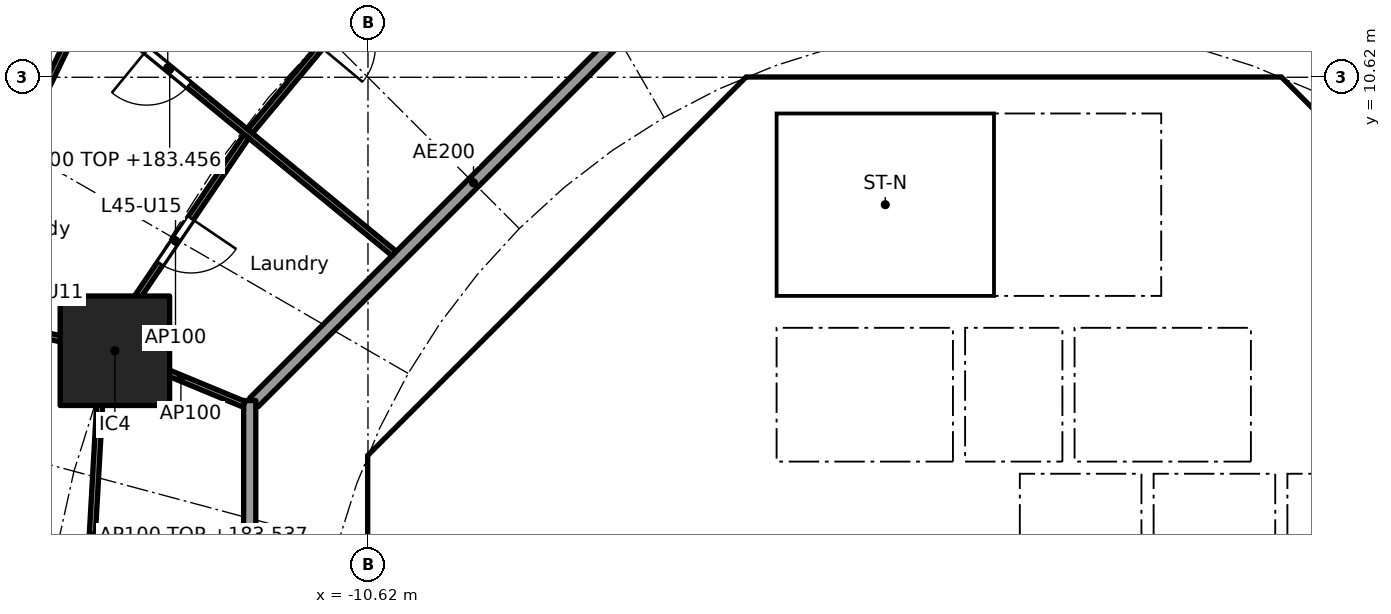
"""IFC4 building model, lengths in metres.
Left out: names, types, materials, properties, quantities, classifications, styles, units other than length and angle.
Written with IfcOpenShell. Run it as: python <this file> out.ifc"""

import sys

from ifc_helpers import new_model, si_unit, direction, frame, frame_2d, origin, origin_2d, place, context, subcontext, project, spatial, polyline, rectangle, outline, extrude, element, fill, save


model = new_model("IFC4")
c1 = context("Model", 3, precision=1e-05, world=origin(), true_north=direction((0.0, 1.0)))
c2 = subcontext(c1, "Body", "Model", "MODEL_VIEW")
j1 = project(units=[si_unit("LENGTHUNIT", "METRE"), si_unit("PLANEANGLEUNIT", "RADIAN")], contexts=[c1])
p1 = place(None, origin())
s1 = spatial("IfcSite", under=j1, at=p1, CompositionType="ELEMENT")
p2 = place(p1, origin())
s2 = spatial("IfcBuilding", under=s1, at=p2, CompositionType="ELEMENT")
p3 = place(p2, frame((0.0, 0.0, 180.7)))
s3 = spatial("IfcBuildingStorey", under=s2, at=p3, CompositionType="ELEMENT", Elevation=180.7)
p4 = place(p3, frame((-14.782, 6.123, 0.0), z_axis=(0.0, 0.0, 1.0), x_axis=(1.0, 0.0, 0.0)))
e1 = element("IfcColumn", 1, at=p4, inside=s3, PredefinedType="COLUMN", context=c2, shape_type="SweptSolid", body=[
    extrude(rectangle(XDim=1.8, YDim=1.8, at=origin_2d()), origin(), (0.0, 0.0, 1.0), 3.7),
])
p5 = place(p3, frame((9.988, 4.613, 0.0), z_axis=(0.0, 0.0, 1.0), x_axis=(-0.707106781187, 0.707106781187, 0.0)))
e2 = element("IfcWall", 2, at=p5, inside=s3, PredefinedType="SHEAR", context=c2, shape_type="SweptSolid", body=[
    extrude(rectangle(XDim=7.602, YDim=0.6, at=frame_2d((3.801, 0.0))), origin(), (0.0, 0.0, 1.0), 3.44),
])
p6 = place(p5, frame((3.201, 0.0, 0.0)))
e3 = element("IfcOpeningElement", 3, at=p6, cuts=e2, PredefinedType="OPENING", context=c2, shape_type="SweptSolid", body=[
    extrude(rectangle(XDim=1.2, YDim=2.1, at=frame_2d((0.6, 1.05))), frame((0.0, 0.31, 0.0), z_axis=(0.0, -1.0, 0.0), x_axis=(1.0, 0.0, 0.0)), (0.0, 0.0, 1.0), 0.62),
])
p7 = place(p3, frame((-4.613, 9.988, 0.0), z_axis=(0.0, 0.0, 1.0), x_axis=(-0.707106781187, -0.707106781187, 0.0)))
e4 = element("IfcWall", 4, at=p7, inside=s3, PredefinedType="SHEAR", context=c2, shape_type="SweptSolid", body=[
    extrude(rectangle(XDim=7.602, YDim=0.6, at=frame_2d((3.801, 0.0))), origin(), (0.0, 0.0, 1.0), 3.44),
])
p8 = place(p7, frame((0.351, 0.0, 0.0)))
e5 = element("IfcOpeningElement", 5, at=p8, cuts=e4, PredefinedType="OPENING", context=c2, shape_type="SweptSolid", body=[
    extrude(rectangle(XDim=1.1, YDim=2.1, at=frame_2d((0.55, 1.05))), frame((0.0, 0.31, 0.0), z_axis=(0.0, -1.0, 0.0), x_axis=(1.0, 0.0, 0.0)), (0.0, 0.0, 1.0), 0.62),
])
p9 = place(p3, frame((-10.325, 3.801, 0.0), z_axis=(0.0, 0.0, 1.0), x_axis=(0.0, -1.0, 0.0)))
e6 = element("IfcWall", 6, at=p9, inside=s3, PredefinedType="SHEAR", context=c2, shape_type="SweptSolid", body=[
    extrude(rectangle(XDim=7.602, YDim=0.6, at=frame_2d((3.801, 0.0))), origin(), (0.0, 0.0, 1.0), 3.44),
])
p10 = place(p9, frame((0.651, 0.0, 0.0)))
e7 = element("IfcOpeningElement", 7, at=p10, cuts=e6, PredefinedType="OPENING", context=c2, shape_type="SweptSolid", body=[
    extrude(rectangle(XDim=1.5, YDim=2.1, at=frame_2d((0.75, 1.05))), frame((0.0, 0.31, 0.0), z_axis=(0.0, -1.0, 0.0), x_axis=(1.0, 0.0, 0.0)), (0.0, 0.0, 1.0), 0.62),
])
p11 = place(p9, frame((5.451, 0.0, 0.0)))
e8 = element("IfcOpeningElement", 8, at=p11, cuts=e6, PredefinedType="OPENING", context=c2, shape_type="SweptSolid", body=[
    extrude(rectangle(XDim=1.5, YDim=2.1, at=frame_2d((0.75, 1.05))), frame((0.0, 0.31, 0.0), z_axis=(0.0, -1.0, 0.0), x_axis=(1.0, 0.0, 0.0)), (0.0, 0.0, 1.0), 0.62),
])
p12 = place(p3, frame((-5.8, 4.3, 0.0), z_axis=(0.0, 0.0, 1.0), x_axis=(0.0, 1.0, 0.0)))
e9 = element("IfcWall", 9, at=p12, inside=s3, PredefinedType="PARTITIONING", context=c2, shape_type="SweptSolid", body=[
    extrude(rectangle(XDim=3.927, YDim=0.15, at=frame_2d((1.963, 0.0))), origin(), (0.0, 0.0, 1.0), 3.44),
])
p13 = place(p12, frame((0.413, 0.0, 0.0)))
e10 = element("IfcOpeningElement", 10, at=p13, cuts=e9, PredefinedType="OPENING", context=c2, shape_type="SweptSolid", body=[
    extrude(rectangle(XDim=0.9, YDim=2.1, at=frame_2d((0.45, 1.05))), frame((0.0, 0.085, 0.0), z_axis=(0.0, -1.0, 0.0), x_axis=(1.0, 0.0, 0.0)), (0.0, 0.0, 1.0), 0.17),
])
p14 = place(p12, frame((2.489, 0.0, 0.0)))
e11 = element("IfcOpeningElement", 11, at=p14, cuts=e9, PredefinedType="OPENING", context=c2, shape_type="SweptSolid", body=[
    extrude(rectangle(XDim=0.9, YDim=2.1, at=frame_2d((0.45, 1.05))), frame((0.0, 0.085, 0.0), z_axis=(0.0, -1.0, 0.0), x_axis=(1.0, 0.0, 0.0)), (0.0, 0.0, 1.0), 0.17),
])
p15 = place(p3, frame((4.0, 4.3, 0.0), z_axis=(0.0, 0.0, 1.0), x_axis=(0.0, 1.0, 0.0)))
e12 = element("IfcWall", 12, at=p15, inside=s3, PredefinedType="SOLIDWALL", context=c2, shape_type="SweptSolid", body=[
    extrude(rectangle(XDim=2.2, YDim=0.2, at=frame_2d((1.1, 0.0))), origin(), (0.0, 0.0, 1.0), 3.44),
])
p16 = place(p15, frame((0.55, 0.0, 0.0)))
e13 = element("IfcOpeningElement", 13, at=p16, cuts=e12, PredefinedType="OPENING", context=c2, shape_type="SweptSolid", body=[
    extrude(rectangle(XDim=1.1, YDim=2.1, at=frame_2d((0.55, 1.05))), frame((0.0, 0.11, 0.0), z_axis=(0.0, -1.0, 0.0), x_axis=(1.0, 0.0, 0.0)), (0.0, 0.0, 1.0), 0.22),
])
p17 = place(p3, frame((-4.0, 4.3, 0.0), z_axis=(0.0, 0.0, 1.0), x_axis=(0.0, 1.0, 0.0)))
e14 = element("IfcWall", 14, at=p17, inside=s3, PredefinedType="SOLIDWALL", context=c2, shape_type="SweptSolid", body=[
    extrude(rectangle(XDim=2.2, YDim=0.2, at=frame_2d((1.1, 0.0))), origin(), (0.0, 0.0, 1.0), 3.44),
])
p18 = place(p17, frame((0.55, 0.0, 0.0)))
e15 = element("IfcOpeningElement", 15, at=p18, cuts=e14, PredefinedType="OPENING", context=c2, shape_type="SweptSolid", body=[
    extrude(rectangle(XDim=1.1, YDim=2.1, at=frame_2d((0.55, 1.05))), frame((0.0, 0.11, 0.0), z_axis=(0.0, -1.0, 0.0), x_axis=(1.0, 0.0, 0.0)), (0.0, 0.0, 1.0), 0.22),
])
p19 = place(p3, frame((4.0, 7.025, 0.0), z_axis=(0.0, 0.0, 1.0), x_axis=(0.0, 1.0, 0.0)))
e16 = element("IfcWall", 16, at=p19, inside=s3, PredefinedType="SOLIDWALL", context=c2, shape_type="SweptSolid", body=[
    extrude(rectangle(XDim=3.0, YDim=0.2, at=frame_2d((1.5, 0.0))), origin(), (0.0, 0.0, 1.0), 3.44),
])
p20 = place(p19, frame((0.925, 0.0, 0.0)))
e17 = element("IfcOpeningElement", 17, at=p20, cuts=e16, PredefinedType="OPENING", context=c2, shape_type="SweptSolid", body=[
    extrude(rectangle(XDim=1.1, YDim=2.1, at=frame_2d((0.55, 1.05))), frame((0.0, 0.11, 0.0), z_axis=(0.0, -1.0, 0.0), x_axis=(1.0, 0.0, 0.0)), (0.0, 0.0, 1.0), 0.22),
])
p21 = place(p3, origin())
e18 = element("IfcWall", 18, at=p21, inside=s3, PredefinedType="SHEAR", context=c2, shape_type="SweptSolid", body=[
    extrude(outline(polyline([(-10.2, 4.825), (-9.776, 4.401), (-10.025, 4.152), (-10.025, 3.801), (-10.625, 3.801), (-10.625, 4.401), (-10.2, 4.825)])), origin(), (0.0, 0.0, 1.0), 3.44),
])
p22 = place(p3, origin())
e19 = element("IfcWall", 19, at=p22, inside=s3, PredefinedType="SHEAR", context=c2, shape_type="SweptSolid", body=[
    extrude(outline(polyline([(-4.152, 10.025), (-4.401, 9.776), (-4.825, 10.2), (-4.401, 10.625), (4.401, 10.625), (4.825, 10.2), (4.401, 9.776), (4.152, 10.025), (-4.152, 10.025)])), origin(), (0.0, 0.0, 1.0), 3.44),
])
p23 = place(p3, frame((-10.025, 4.0, 0.0), z_axis=(0.0, 0.0, 1.0), x_axis=(1.0, 0.0, 0.0)))
e20 = element("IfcWall", 20, at=p23, inside=s3, PredefinedType="PARTITIONING", context=c2, shape_type="SweptSolid", body=[
    extrude(rectangle(XDim=3.325, YDim=0.2, at=frame_2d((1.662, 0.0))), origin(), (0.0, 0.0, 1.0), 3.44),
])
p24 = place(p3, frame((-8.001, 6.1, 0.0), z_axis=(0.0, 0.0, 1.0), x_axis=(1.0, 0.0, 0.0)))
e21 = element("IfcWall", 21, at=p24, inside=s3, PredefinedType="PARTITIONING", context=c2, shape_type="SweptSolid", body=[
    extrude(rectangle(XDim=2.126, YDim=0.15, at=frame_2d((1.063, 0.0))), origin(), (0.0, 0.0, 1.0), 3.44),
])
for number, where, z_axis, x_axis in (
    (22, (-0.9, 4.3, 0.0), (0.0, 0.0, 1.0), (0.0, 1.0, 0.0)),
    (23, (0.9, 4.3, 0.0), (0.0, 0.0, 1.0), (0.0, 1.0, 0.0)),
):
    element("IfcWall", number, at=place(p3, frame(where, z_axis=z_axis, x_axis=x_axis)), inside=s3, PredefinedType="SOLIDWALL", context=c2, shape_type="SweptSolid", body=[
        extrude(rectangle(XDim=2.2, YDim=0.2, at=frame_2d((1.1, 0.0))), origin(), (0.0, 0.0, 1.0), 3.44),
    ])
p25 = place(p3, origin())
e24 = element("IfcWall", 24, at=p25, inside=s3, PredefinedType="SOLIDWALL", context=c2, shape_type="SweptSolid", body=[
    extrude(outline(polyline([(-6.7, 4.3), (6.7, 4.3), (6.7, 2.1), (6.5, 2.1), (6.5, 4.1), (4.5, 4.1), (4.5, 2.1), (4.3, 2.1), (4.3, 4.1), (2.3, 4.1), (2.3, 2.1), (2.1, 2.1), (2.1, 4.1), (0.1, 4.1), (0.1, 2.1), (-0.1, 2.1), (-0.1, 4.1), (-4.3, 4.1), (-4.3, 2.1), (-4.5, 2.1), (-4.5, 4.1), (-6.5, 4.1), (-6.5, 2.1), (-6.7, 2.1), (-6.7, 4.3)])), origin(), (0.0, 0.0, 1.0), 3.44),
])
p26 = place(p3, origin())
e25 = element("IfcWall", 25, at=p26, inside=s3, PredefinedType="SOLIDWALL", context=c2, shape_type="SweptSolid", body=[
    extrude(outline(polyline([(-3.9, 7.025), (-4.1, 7.025), (-4.1, 10.025), (-3.9, 10.025), (-3.9, 7.025)])), origin(), (0.0, 0.0, 1.0), 3.44),
])
p27 = place(p3, origin())
e26 = element("IfcWall", 26, at=p27, inside=s3, PredefinedType="SOLIDWALL", context=c2, shape_type="SweptSolid", body=[
    extrude(outline(polyline([(4.1, 6.5), (-4.1, 6.5), (-4.1, 7.025), (4.1, 7.025), (4.1, 6.5)])), origin(), (0.0, 0.0, 1.0), 3.44),
])
p28 = place(p3, frame((-5.275, 12.494, 0.0), z_axis=(0.0, 0.0, 1.0), x_axis=(-0.707106781187, -0.707106781187, 0.0)))
e27 = element("IfcWall", 27, at=p28, inside=s3, PredefinedType="PARTITIONING", context=c2, shape_type="SweptSolid", body=[
    extrude(rectangle(XDim=10.209, YDim=0.2, at=frame_2d((5.104, 0.0))), origin(), (0.0, 0.0, 1.0), 3.44),
])
p29 = place(p3, frame((-12.565, 5.304, 0.0), z_axis=(0.0, 0.0, 1.0), x_axis=(0.0, -1.0, 0.0)))
e28 = element("IfcWall", 28, at=p29, inside=s3, PredefinedType="PARTITIONING", context=c2, shape_type="SweptSolid", body=[
    extrude(rectangle(XDim=10.409, YDim=0.2, at=frame_2d((5.205, 0.0))), origin(), (0.0, 0.0, 1.0), 3.44),
])
p30 = place(p3, frame((-9.631, 13.242, 0.0), z_axis=(0.0, 0.0, 1.0), x_axis=(-0.640315711982, -0.768111833647, 0.0)))
e29 = element("IfcWall", 29, at=p30, inside=s3, PredefinedType="PARTITIONING", context=c2, shape_type="SweptSolid", body=[
    extrude(rectangle(XDim=4.572, YDim=0.1, at=frame_2d((2.286, 0.0))), origin(), (0.0, 0.0, 1.0), 2.837),
])
p31 = place(p30, frame((1.861, 0.0, 0.0)))
e30 = element("IfcOpeningElement", 30, at=p31, cuts=e29, PredefinedType="OPENING", context=c2, shape_type="SweptSolid", body=[
    extrude(rectangle(XDim=0.9, YDim=2.1, at=frame_2d((0.45, 1.05))), frame((0.0, 0.06, 0.0), z_axis=(0.0, -1.0, 0.0), x_axis=(1.0, 0.0, 0.0)), (0.0, 0.0, 1.0), 0.12),
])
p32 = place(p3, frame((-10.189, 7.721, 0.0), z_axis=(0.0, 0.0, 1.0), x_axis=(-0.773134429339, 0.634242188892, 0.0)))
e31 = element("IfcWall", 31, at=p32, inside=s3, PredefinedType="PARTITIONING", context=c2, shape_type="SweptSolid", body=[
    extrude(rectangle(XDim=9.552, YDim=0.1, at=frame_2d((4.776, 0.0))), origin(), (0.0, 0.0, 1.0), 2.756),
])
p33 = place(p32, frame((4.367, 0.0, 0.0)))
e32 = element("IfcOpeningElement", 32, at=p33, cuts=e31, PredefinedType="OPENING", context=c2, shape_type="SweptSolid", body=[
    extrude(rectangle(XDim=0.9, YDim=2.1, at=frame_2d((0.45, 1.05))), frame((0.0, 0.06, 0.0), z_axis=(0.0, -1.0, 0.0), x_axis=(1.0, 0.0, 0.0)), (0.0, 0.0, 1.0), 0.12),
])
p34 = place(p3, frame((-12.619, 9.65, 0.0), z_axis=(0.0, 0.0, 1.0), x_axis=(-0.561064907171, -0.827771810308, 0.0)))
e33 = element("IfcWall", 33, at=p34, inside=s3, PredefinedType="PARTITIONING", context=c2, shape_type="SweptSolid", body=[
    extrude(rectangle(XDim=4.159, YDim=0.1, at=frame_2d((2.079, 0.0))), origin(), (0.0, 0.0, 1.0), 3.44),
])
p35 = place(p34, frame((1.629, 0.0, 0.0)))
e34 = element("IfcOpeningElement", 34, at=p35, cuts=e33, PredefinedType="OPENING", context=c2, shape_type="SweptSolid", body=[
    extrude(rectangle(XDim=0.9, YDim=2.1, at=frame_2d((0.45, 1.05))), frame((0.0, 0.06, 0.0), z_axis=(0.0, -1.0, 0.0), x_axis=(1.0, 0.0, 0.0)), (0.0, 0.0, 1.0), 0.12),
])
p36 = place(p3, frame((-15.257, 11.816, 0.0), z_axis=(0.0, 0.0, 1.0), x_axis=(-0.434040130629, -0.900893536997, 0.0)))
e35 = element("IfcWall", 35, at=p36, inside=s3, PredefinedType="PARTITIONING", context=c2, shape_type="SweptSolid", body=[
    extrude(rectangle(XDim=5.558, YDim=0.1, at=frame_2d((2.779, 0.0))), origin(), (0.0, 0.0, 1.0), 3.44),
])
p37 = place(p3, frame((-12.657, 5.243, 0.0), z_axis=(0.0, 0.0, 1.0), x_axis=(-0.923848837015, 0.382757529444, 0.0)))
e36 = element("IfcWall", 36, at=p37, inside=s3, PredefinedType="PARTITIONING", context=c2, shape_type="SweptSolid", body=[
    extrude(rectangle(XDim=2.25, YDim=0.1, at=frame_2d((1.125, 0.0))), origin(), (0.0, 0.0, 1.0), 3.44),
])
p38 = place(p3, frame((-14.831, 6.134, 0.0), z_axis=(0.0, 0.0, 1.0), x_axis=(-0.976560749847, 0.215241961191, 0.0)))
e37 = element("IfcWall", 37, at=p38, inside=s3, PredefinedType="PARTITIONING", context=c2, shape_type="SweptSolid", body=[
    extrude(rectangle(XDim=2.879, YDim=0.1, at=frame_2d((1.439, 0.0))), origin(), (0.0, 0.0, 1.0), 3.44),
])
p39 = place(p38, frame((1.291, 0.0, 0.0)))
e38 = element("IfcOpeningElement", 38, at=p39, cuts=e37, PredefinedType="OPENING", context=c2, shape_type="SweptSolid", body=[
    extrude(rectangle(XDim=0.9, YDim=2.1, at=frame_2d((0.45, 1.05))), frame((0.0, 0.06, 0.0), z_axis=(0.0, -1.0, 0.0), x_axis=(1.0, 0.0, 0.0)), (0.0, 0.0, 1.0), 0.12),
])
p40 = place(p3, frame((-14.983, 6.117, 0.0), z_axis=(0.0, 0.0, 1.0), x_axis=(-0.056328933432, -0.998412265178, 0.0)))
e39 = element("IfcWall", 39, at=p40, inside=s3, PredefinedType="PARTITIONING", context=c2, shape_type="SweptSolid", body=[
    extrude(rectangle(XDim=6.077, YDim=0.1, at=frame_2d((3.038, 0.0))), origin(), (0.0, 0.0, 1.0), 2.837),
])
p41 = place(p16, origin())
e40 = element("IfcDoor", 40, at=p41, inside=s3, OperationType="DOUBLE_DOOR_SLIDING", PredefinedType="DOOR", context=c2, shape_type="SweptSolid", body=[
    extrude(rectangle(XDim=1.1, YDim=2.1, at=frame_2d((0.55, 1.05))), frame((0.0, 0.025, 0.0), z_axis=(0.0, -1.0, 0.0), x_axis=(1.0, 0.0, 0.0)), (0.0, 0.0, 1.0), 0.05),
])
fill(e13, e40)
p42 = place(p18, origin())
e41 = element("IfcDoor", 41, at=p42, inside=s3, OperationType="DOUBLE_DOOR_SLIDING", PredefinedType="DOOR", context=c2, shape_type="SweptSolid", body=[
    extrude(rectangle(XDim=1.1, YDim=2.1, at=frame_2d((0.55, 1.05))), frame((0.0, 0.025, 0.0), z_axis=(0.0, -1.0, 0.0), x_axis=(1.0, 0.0, 0.0)), (0.0, 0.0, 1.0), 0.05),
])
fill(e15, e41)
p43 = place(p20, origin())
e42 = element("IfcDoor", 42, at=p43, inside=s3, OperationType="SINGLE_SWING_LEFT", PredefinedType="DOOR", context=c2, shape_type="SweptSolid", body=[
    extrude(rectangle(XDim=1.1, YDim=2.1, at=frame_2d((0.55, 1.05))), frame((0.0, 0.025, 0.0), z_axis=(0.0, -1.0, 0.0), x_axis=(1.0, 0.0, 0.0)), (0.0, 0.0, 1.0), 0.05),
])
fill(e17, e42)
p44 = place(p13, origin())
e43 = element("IfcDoor", 43, at=p44, inside=s3, OperationType="SINGLE_SWING_RIGHT", PredefinedType="DOOR", context=c2, shape_type="SweptSolid", body=[
    extrude(rectangle(XDim=0.9, YDim=2.1, at=frame_2d((0.45, 1.05))), frame((0.0, 0.025, 0.0), z_axis=(0.0, -1.0, 0.0), x_axis=(1.0, 0.0, 0.0)), (0.0, 0.0, 1.0), 0.05),
])
fill(e10, e43)
p45 = place(p14, origin())
e44 = element("IfcDoor", 44, at=p45, inside=s3, OperationType="SINGLE_SWING_RIGHT", PredefinedType="DOOR", context=c2, shape_type="SweptSolid", body=[
    extrude(rectangle(XDim=0.9, YDim=2.1, at=frame_2d((0.45, 1.05))), frame((0.0, 0.025, 0.0), z_axis=(0.0, -1.0, 0.0), x_axis=(1.0, 0.0, 0.0)), (0.0, 0.0, 1.0), 0.05),
])
fill(e11, e44)
p46 = place(p10, origin())
e45 = element("IfcDoor", 45, at=p46, inside=s3, OperationType="DOUBLE_DOOR_SINGLE_SWING", PredefinedType="DOOR", context=c2, shape_type="SweptSolid", body=[
    extrude(rectangle(XDim=1.5, YDim=2.1, at=frame_2d((0.75, 1.05))), frame((0.0, 0.025, 0.0), z_axis=(0.0, -1.0, 0.0), x_axis=(1.0, 0.0, 0.0)), (0.0, 0.0, 1.0), 0.05),
])
fill(e7, e45)
p47 = place(p8, origin())
e46 = element("IfcDoor", 46, at=p47, inside=s3, OperationType="SINGLE_SWING_LEFT", PredefinedType="DOOR", context=c2, shape_type="SweptSolid", body=[
    extrude(rectangle(XDim=1.1, YDim=2.1, at=frame_2d((0.55, 1.05))), frame((0.0, 0.025, 0.0), z_axis=(0.0, -1.0, 0.0), x_axis=(1.0, 0.0, 0.0)), (0.0, 0.0, 1.0), 0.05),
])
fill(e5, e46)
p48 = place(p33, origin())
e47 = element("IfcDoor", 47, at=p48, inside=s3, OperationType="SINGLE_SWING_RIGHT", PredefinedType="DOOR", context=c2, shape_type="SweptSolid", body=[
    extrude(rectangle(XDim=0.9, YDim=2.1, at=frame_2d((0.45, 1.05))), frame((0.0, 0.025, 0.0), z_axis=(0.0, -1.0, 0.0), x_axis=(1.0, 0.0, 0.0)), (0.0, 0.0, 1.0), 0.05),
])
fill(e32, e47)
p49 = place(p35, origin())
e48 = element("IfcDoor", 48, at=p49, inside=s3, OperationType="SINGLE_SWING_LEFT", PredefinedType="DOOR", context=c2, shape_type="SweptSolid", body=[
    extrude(rectangle(XDim=0.9, YDim=2.1, at=frame_2d((0.45, 1.05))), frame((0.0, 0.025, 0.0), z_axis=(0.0, -1.0, 0.0), x_axis=(1.0, 0.0, 0.0)), (0.0, 0.0, 1.0), 0.05),
])
fill(e34, e48)
save(model, sys.argv[1])
